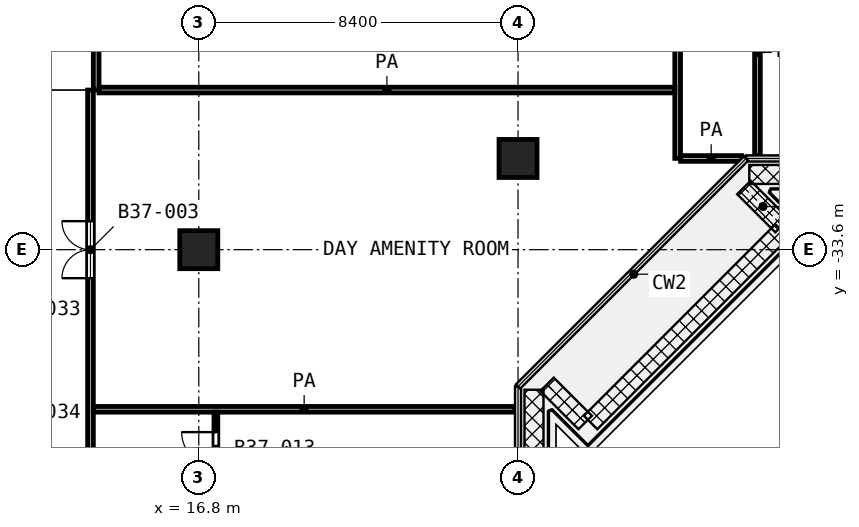
"""IFC4 building model, lengths in metres.
Left out: names, types, materials, properties, quantities, classifications, styles, units other than length and angle.
Written with IfcOpenShell. Run it as: python <this file> out.ifc"""

import sys

from ifc_helpers import new_model, si_unit, direction, frame, frame_2d, origin, origin_2d, place, context, subcontext, project, spatial, rectangle, extrude, element, fill, save


model = new_model("IFC4")
c1 = context("Model", 3, precision=1e-05, world=origin(), true_north=direction((0.0, 1.0)))
c2 = subcontext(c1, "Body", "Model", "MODEL_VIEW")
j1 = project(units=[si_unit("LENGTHUNIT", "METRE"), si_unit("PLANEANGLEUNIT", "RADIAN")], contexts=[c1])
p1 = place(None, origin())
s1 = spatial("IfcSite", under=j1, at=p1, CompositionType="ELEMENT")
p2 = place(p1, origin())
s2 = spatial("IfcBuilding", under=s1, at=p2, CompositionType="ELEMENT")
p3 = place(p2, frame((0.0, 0.0, 162.6)))
s3 = spatial("IfcBuildingStorey", under=s2, at=p3, CompositionType="ELEMENT", Elevation=162.6)
for number, where, z_axis, x_axis in (
    (1, (25.2, -31.2, 0.0), (0.0, 0.0, 1.0), (1.0, 0.0, 0.0)),
    (2, (16.8, -33.6, 0.0), (0.0, 0.0, 1.0), (1.0, 0.0, 0.0)),
):
    element("IfcColumn", number, at=place(p3, frame(where, z_axis=z_axis, x_axis=x_axis)), inside=s3, PredefinedType="COLUMN", context=c2, shape_type="SweptSolid", body=[
        extrude(rectangle(XDim=1.0, YDim=1.0, at=origin_2d()), origin(), (0.0, 0.0, 1.0), 4.2),
    ])
p4 = place(p3, frame((17.25, -39.9, 0.0), z_axis=(0.0, 0.0, 1.0), x_axis=(0.0, 1.0, 0.0)))
e3 = element("IfcWall", 3, at=p4, inside=s3, PredefinedType="PARTITIONING", context=c2, shape_type="SweptSolid", body=[
    extrude(rectangle(XDim=2.025, YDim=0.1, at=frame_2d((1.012, 0.0))), origin(), (0.0, 0.0, 1.0), 3.6),
])
p5 = place(p4, frame((0.6, 0.0, 0.0)))
e4 = element("IfcOpeningElement", 4, at=p5, cuts=e3, PredefinedType="OPENING", context=c2, shape_type="SweptSolid", body=[
    extrude(rectangle(XDim=0.9, YDim=2.1, at=frame_2d((0.45, 1.05))), frame((0.0, 0.06, 0.0), z_axis=(0.0, -1.0, 0.0), x_axis=(1.0, 0.0, 0.0)), (0.0, 0.0, 1.0), 0.12),
])
p6 = place(p3, frame((14.025, -37.8, 0.0), z_axis=(0.0, 0.0, 1.0), x_axis=(1.0, 0.0, 0.0)))
e5 = element("IfcWall", 5, at=p6, inside=s3, PredefinedType="PARTITIONING", context=c2, shape_type="SweptSolid", body=[
    extrude(rectangle(XDim=11.095, YDim=0.15, at=frame_2d((5.548, 0.0))), origin(), (0.0, 0.0, 1.0), 3.6),
])
p7 = place(p3, frame((29.477, -31.2, 0.0), z_axis=(0.0, 0.0, 1.0), x_axis=(1.0, 0.0, 0.0)))
e6 = element("IfcWall", 6, at=p7, inside=s3, PredefinedType="PARTITIONING", context=c2, shape_type="SweptSolid", body=[
    extrude(rectangle(XDim=1.61, YDim=0.15, at=frame_2d((0.805, 0.0))), origin(), (0.0, 0.0, 1.0), 3.6),
])
p8 = place(p3, frame((14.175, -29.4, 0.0), z_axis=(0.0, 0.0, 1.0), x_axis=(1.0, 0.0, 0.0)))
e7 = element("IfcWall", 7, at=p8, inside=s3, PredefinedType="PARTITIONING", context=c2, shape_type="SweptSolid", body=[
    extrude(rectangle(XDim=15.15, YDim=0.15, at=frame_2d((7.575, 0.0))), origin(), (0.0, 0.0, 1.0), 3.6),
])
p9 = place(p3, frame((13.95, -58.72, 0.0), z_axis=(0.0, 0.0, 1.0), x_axis=(0.0, 1.0, 0.0)))
e8 = element("IfcWall", 8, at=p9, inside=s3, PredefinedType="PARTITIONING", context=c2, shape_type="SweptSolid", body=[
    extrude(rectangle(XDim=29.32, YDim=0.15, at=frame_2d((14.66, 0.0))), origin(), (0.0, 0.0, 1.0), 3.6),
])
p10 = place(p9, frame((24.37, 0.0, 0.0)))
e9 = element("IfcOpeningElement", 9, at=p10, cuts=e8, PredefinedType="OPENING", context=c2, shape_type="SweptSolid", body=[
    extrude(rectangle(XDim=1.5, YDim=2.1, at=frame_2d((0.75, 1.05))), frame((0.0, 0.085, 0.0), z_axis=(0.0, -1.0, 0.0), x_axis=(1.0, 0.0, 0.0)), (0.0, 0.0, 1.0), 0.17),
])
p11 = place(p9, frame((17.62, 0.0, 0.0)))
e10 = element("IfcOpeningElement", 10, at=p11, cuts=e8, PredefinedType="OPENING", context=c2, shape_type="SweptSolid", body=[
    extrude(rectangle(XDim=1.0, YDim=2.1, at=frame_2d((0.5, 1.05))), frame((0.0, 0.085, 0.0), z_axis=(0.0, -1.0, 0.0), x_axis=(1.0, 0.0, 0.0)), (0.0, 0.0, 1.0), 0.17),
])
p12 = place(p9, frame((15.32, 0.0, 0.0)))
e11 = element("IfcOpeningElement", 11, at=p12, cuts=e8, PredefinedType="OPENING", context=c2, shape_type="SweptSolid", body=[
    extrude(rectangle(XDim=1.0, YDim=2.1, at=frame_2d((0.5, 1.05))), frame((0.0, 0.085, 0.0), z_axis=(0.0, -1.0, 0.0), x_axis=(1.0, 0.0, 0.0)), (0.0, 0.0, 1.0), 0.17),
])
p13 = place(p9, frame((5.17, 0.0, 0.0)))
e12 = element("IfcOpeningElement", 12, at=p13, cuts=e8, PredefinedType="OPENING", context=c2, shape_type="SweptSolid", body=[
    extrude(rectangle(XDim=1.5, YDim=2.1, at=frame_2d((0.75, 1.05))), frame((0.0, 0.085, 0.0), z_axis=(0.0, -1.0, 0.0), x_axis=(1.0, 0.0, 0.0)), (0.0, 0.0, 1.0), 0.17),
])
p14 = place(p3, frame((14.1, -29.4, 0.0), z_axis=(0.0, 0.0, 1.0), x_axis=(0.0, 1.0, 0.0)))
e13 = element("IfcWall", 13, at=p14, inside=s3, PredefinedType="PARTITIONING", context=c2, shape_type="SweptSolid", body=[
    extrude(rectangle(XDim=4.5, YDim=0.15, at=frame_2d((2.25, 0.0))), origin(), (0.0, 0.0, 1.0), 3.6),
])
p15 = place(p3, frame((29.4, -31.198, 0.0), z_axis=(0.0, 0.0, 1.0), x_axis=(0.0, 1.0, 0.0)))
e14 = element("IfcWall", 14, at=p15, inside=s3, PredefinedType="PARTITIONING", context=c2, shape_type="SweptSolid", body=[
    extrude(rectangle(XDim=17.098, YDim=0.15, at=frame_2d((8.549, 0.0))), origin(), (0.0, 0.0, 1.0), 3.6),
])
p16 = place(p3, frame((31.5, -31.12, 0.0), z_axis=(0.0, 0.0, 1.0), x_axis=(0.0, 1.0, 0.0)))
e15 = element("IfcWall", 15, at=p16, inside=s3, PredefinedType="PARTITIONING", context=c2, shape_type="SweptSolid", body=[
    extrude(rectangle(XDim=5.418, YDim=0.15, at=frame_2d((2.709, 0.0))), origin(), (0.0, 0.0, 1.0), 3.6),
])
p17 = place(p10, origin())
e16 = element("IfcDoor", 16, at=p17, inside=s3, OperationType="DOUBLE_DOOR_SINGLE_SWING", PredefinedType="DOOR", context=c2, shape_type="SweptSolid", body=[
    extrude(rectangle(XDim=1.5, YDim=2.1, at=frame_2d((0.75, 1.05))), frame((0.0, 0.025, 0.0), z_axis=(0.0, -1.0, 0.0), x_axis=(1.0, 0.0, 0.0)), (0.0, 0.0, 1.0), 0.05),
])
fill(e9, e16)
p18 = place(p5, origin())
e17 = element("IfcDoor", 17, at=p18, inside=s3, OperationType="SINGLE_SWING_RIGHT", PredefinedType="DOOR", context=c2, shape_type="SweptSolid", body=[
    extrude(rectangle(XDim=0.9, YDim=2.1, at=frame_2d((0.45, 1.05))), frame((0.0, 0.025, 0.0), z_axis=(0.0, -1.0, 0.0), x_axis=(1.0, 0.0, 0.0)), (0.0, 0.0, 1.0), 0.05),
])
fill(e4, e17)
save(model, sys.argv[1])
